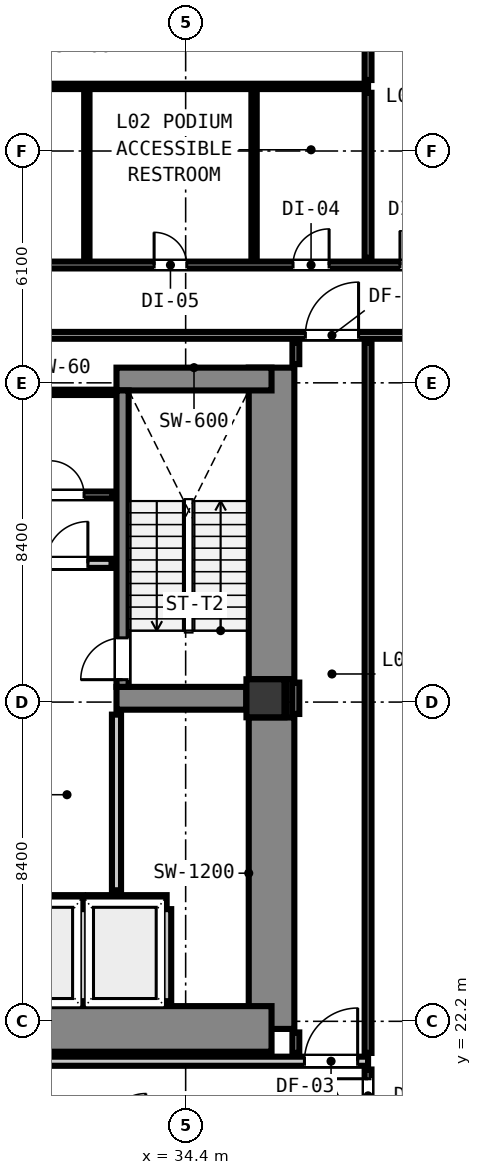
"""IFC4 building model, lengths in metres.
Left out: names, types, materials, properties, quantities, classifications, styles, units other than length and angle.
Written with IfcOpenShell. Run it as: python <this file> out.ifc"""

import sys

from ifc_helpers import new_model, si_unit, direction, frame, frame_2d, origin, origin_2d, place, context, subcontext, project, spatial, rectangle, extrude, element, fill, save


model = new_model("IFC4")
c1 = context("Model", 3, precision=1e-05, world=origin(), true_north=direction((0.0, 1.0)))
c2 = subcontext(c1, "Body", "Model", "MODEL_VIEW")
j1 = project(units=[si_unit("LENGTHUNIT", "METRE"), si_unit("PLANEANGLEUNIT", "RADIAN")], contexts=[c1])
p1 = place(None, origin())
s1 = spatial("IfcSite", under=j1, at=p1, CompositionType="ELEMENT")
p2 = place(p1, origin())
s2 = spatial("IfcBuilding", under=s1, at=p2, CompositionType="ELEMENT")
p3 = place(p2, frame((0.0, 0.0, 9.4)))
s3 = spatial("IfcBuildingStorey", under=s2, at=p3, CompositionType="ELEMENT", Elevation=9.4)
p4 = place(p3, frame((36.5, 30.7, 0.0), z_axis=(0.0, 0.0, 1.0), x_axis=(1.0, 0.0, 0.0)))
e1 = element("IfcColumn", 1, at=p4, inside=s3, PredefinedType="COLUMN", context=c2, shape_type="SweptSolid", body=[
    extrude(rectangle(XDim=1.0, YDim=1.0, at=origin_2d()), origin(), (0.0, 0.0, 1.0), 4.2),
])
p5 = place(p3, frame((36.66, 22.0, 0.0), z_axis=(0.0, 0.0, 1.0), x_axis=(0.0, 1.0, 0.0)))
e2 = element("IfcWall", 2, at=p5, inside=s3, PredefinedType="SHEAR", context=c2, shape_type="SweptSolid", body=[
    extrude(rectangle(XDim=8.195, YDim=1.2, at=frame_2d((4.098, 0.0))), origin(), (0.0, 0.0, 1.0), 4.2),
])
p6 = place(p3, frame((36.66, 31.205, 0.0), z_axis=(0.0, 0.0, 1.0), x_axis=(0.0, 1.0, 0.0)))
e3 = element("IfcWall", 3, at=p6, inside=s3, PredefinedType="SHEAR", context=c2, shape_type="SweptSolid", body=[
    extrude(rectangle(XDim=8.195, YDim=1.2, at=frame_2d((4.097, 0.0))), origin(), (0.0, 0.0, 1.0), 4.2),
])
p7 = place(p3, frame((29.705, 22.0, 0.0), z_axis=(0.0, 0.0, 1.0), x_axis=(1.0, 0.0, 0.0)))
e4 = element("IfcWall", 4, at=p7, inside=s3, PredefinedType="SHEAR", context=c2, shape_type="SweptSolid", body=[
    extrude(rectangle(XDim=6.955, YDim=1.2, at=frame_2d((3.478, 0.0))), origin(), (0.0, 0.0, 1.0), 4.2),
])
p8 = place(p3, frame((32.58, 39.1, 0.0), z_axis=(0.0, 0.0, 1.0), x_axis=(1.0, 0.0, 0.0)))
e5 = element("IfcWall", 5, at=p8, inside=s3, PredefinedType="SHEAR", context=c2, shape_type="SweptSolid", body=[
    extrude(rectangle(XDim=4.08, YDim=0.6, at=frame_2d((2.04, 0.0))), origin(), (0.0, 0.0, 1.0), 4.2),
])
p9 = place(p3, frame((32.58, 30.7, 0.0), z_axis=(0.0, 0.0, 1.0), x_axis=(1.0, 0.0, 0.0)))
e6 = element("IfcWall", 6, at=p9, inside=s3, PredefinedType="SHEAR", context=c2, shape_type="SweptSolid", body=[
    extrude(rectangle(XDim=3.415, YDim=0.6, at=frame_2d((1.708, 0.0))), origin(), (0.0, 0.0, 1.0), 4.2),
])
p10 = place(p3, frame((32.74, 31.0, 0.0), z_axis=(0.0, 0.0, 1.0), x_axis=(0.0, 1.0, 0.0)))
e7 = element("IfcWall", 7, at=p10, inside=s3, PredefinedType="SHEAR", context=c2, shape_type="SweptSolid", body=[
    extrude(rectangle(XDim=7.8, YDim=0.32, at=frame_2d((3.9, 0.0))), origin(), (0.0, 0.0, 1.0), 4.2),
])
p11 = place(p10, frame((0.19, 0.0, 0.0)))
e8 = element("IfcOpeningElement", 8, at=p11, cuts=e7, PredefinedType="OPENING", context=c2, shape_type="SweptSolid", body=[
    extrude(rectangle(XDim=1.1, YDim=2.15, at=frame_2d((0.55, 1.075))), frame((0.0, 0.17, 0.0), z_axis=(0.0, -1.0, 0.0), x_axis=(1.0, 0.0, 0.0)), (0.0, 0.0, 1.0), 0.34),
])
p12 = place(p3, frame((29.5, 25.4, 0.0), z_axis=(0.0, 0.0, 1.0), x_axis=(1.0, 0.0, 0.0)))
e9 = element("IfcWall", 9, at=p12, inside=s3, PredefinedType="PARTITIONING", context=c2, shape_type="SweptSolid", body=[
    extrude(rectangle(XDim=2.2, YDim=0.24, at=frame_2d((1.1, 0.0))), origin(), (0.0, 0.0, 1.0), 3.92),
])
p13 = place(p3, frame((31.7, 22.73, 0.0), z_axis=(0.0, 0.0, 1.0), x_axis=(0.0, 1.0, 0.0)))
e10 = element("IfcWall", 10, at=p13, inside=s3, PredefinedType="PARTITIONING", context=c2, shape_type="SweptSolid", body=[
    extrude(rectangle(XDim=2.422, YDim=0.24, at=frame_2d((1.211, 0.0))), origin(), (0.0, 0.0, 1.0), 3.92),
])
p14 = place(p3, frame((31.828, 25.4, 0.0), z_axis=(0.0, 0.0, 1.0), x_axis=(1.0, 0.0, 0.0)))
e11 = element("IfcWall", 11, at=p14, inside=s3, PredefinedType="PARTITIONING", context=c2, shape_type="SweptSolid", body=[
    extrude(rectangle(XDim=2.072, YDim=0.24, at=frame_2d((1.036, 0.0))), origin(), (0.0, 0.0, 1.0), 3.92),
])
p15 = place(p3, frame((33.9, 22.73, 0.0), z_axis=(0.0, 0.0, 1.0), x_axis=(0.0, 1.0, 0.0)))
e12 = element("IfcWall", 12, at=p15, inside=s3, PredefinedType="PARTITIONING", context=c2, shape_type="SweptSolid", body=[
    extrude(rectangle(XDim=2.422, YDim=0.24, at=frame_2d((1.211, 0.0))), origin(), (0.0, 0.0, 1.0), 3.92),
])
p16 = place(p3, frame((10.5, 21.15, 0.0), z_axis=(0.0, 0.0, 1.0), x_axis=(1.0, 0.0, 0.0)))
e13 = element("IfcWall", 13, at=p16, inside=s3, PredefinedType="PARTITIONING", context=c2, shape_type="SweptSolid", body=[
    extrude(rectangle(XDim=28.7, YDim=0.24, at=frame_2d((14.35, 0.0))), origin(), (0.0, 0.0, 1.0), 3.92),
])
p17 = place(p16, frame((7.71, 0.0, 0.0)))
e14 = element("IfcOpeningElement", 14, at=p17, cuts=e13, PredefinedType="OPENING", context=c2, shape_type="SweptSolid", body=[
    extrude(rectangle(XDim=1.1, YDim=2.15, at=frame_2d((0.55, 1.075))), frame((0.0, 0.13, 0.0), z_axis=(0.0, -1.0, 0.0), x_axis=(1.0, 0.0, 0.0)), (0.0, 0.0, 1.0), 0.26),
])
p18 = place(p16, frame((0.324, 0.0, 0.0)))
e15 = element("IfcOpeningElement", 15, at=p18, cuts=e13, PredefinedType="OPENING", context=c2, shape_type="SweptSolid", body=[
    extrude(rectangle(XDim=1.4, YDim=2.15, at=frame_2d((0.7, 1.075))), frame((0.0, 0.13, 0.0), z_axis=(0.0, -1.0, 0.0), x_axis=(1.0, 0.0, 0.0)), (0.0, 0.0, 1.0), 0.26),
])
p19 = place(p16, frame((27.026, 0.0, 0.0)))
e16 = element("IfcOpeningElement", 16, at=p19, cuts=e13, PredefinedType="OPENING", context=c2, shape_type="SweptSolid", body=[
    extrude(rectangle(XDim=1.4, YDim=2.15, at=frame_2d((0.7, 1.075))), frame((0.0, 0.13, 0.0), z_axis=(0.0, -1.0, 0.0), x_axis=(1.0, 0.0, 0.0)), (0.0, 0.0, 1.0), 0.26),
])
p20 = place(p3, frame((29.975, 34.25, 0.0), z_axis=(0.0, 0.0, 1.0), x_axis=(1.0, 0.0, 0.0)))
e17 = element("IfcWall", 17, at=p20, inside=s3, PredefinedType="PARTITIONING", context=c2, shape_type="SweptSolid", body=[
    extrude(rectangle(XDim=2.475, YDim=0.24, at=frame_2d((1.237, 0.0))), origin(), (0.0, 0.0, 1.0), 3.92),
])
p21 = place(p20, frame((0.752, 0.0, 0.0)))
e18 = element("IfcOpeningElement", 18, at=p21, cuts=e17, PredefinedType="OPENING", context=c2, shape_type="SweptSolid", body=[
    extrude(rectangle(XDim=1.1, YDim=2.15, at=frame_2d((0.55, 1.075))), frame((0.0, 0.13, 0.0), z_axis=(0.0, -1.0, 0.0), x_axis=(1.0, 0.0, 0.0)), (0.0, 0.0, 1.0), 0.26),
])
p22 = place(p3, frame((29.975, 36.05, 0.0), z_axis=(0.0, 0.0, 1.0), x_axis=(1.0, 0.0, 0.0)))
e19 = element("IfcWall", 19, at=p22, inside=s3, PredefinedType="PARTITIONING", context=c2, shape_type="SweptSolid", body=[
    extrude(rectangle(XDim=2.505, YDim=0.18, at=frame_2d((1.252, 0.0))), origin(), (0.0, 0.0, 1.0), 3.92),
])
p23 = place(p22, frame((0.852, 0.0, 0.0)))
e20 = element("IfcOpeningElement", 20, at=p23, cuts=e19, PredefinedType="OPENING", context=c2, shape_type="SweptSolid", body=[
    extrude(rectangle(XDim=0.9, YDim=2.1, at=frame_2d((0.45, 1.05))), frame((0.0, 0.1, 0.0), z_axis=(0.0, -1.0, 0.0), x_axis=(1.0, 0.0, 0.0)), (0.0, 0.0, 1.0), 0.2),
])
p24 = place(p3, frame((10.5, 40.25, 0.0), z_axis=(0.0, 0.0, 1.0), x_axis=(1.0, 0.0, 0.0)))
e21 = element("IfcWall", 21, at=p24, inside=s3, PredefinedType="PARTITIONING", context=c2, shape_type="SweptSolid", body=[
    extrude(rectangle(XDim=37.148, YDim=0.18, at=frame_2d((18.574, 0.0))), origin(), (0.0, 0.0, 1.0), 3.92),
])
p25 = place(p24, frame((6.935, 0.0, 0.0)))
e22 = element("IfcOpeningElement", 22, at=p25, cuts=e21, PredefinedType="OPENING", context=c2, shape_type="SweptSolid", body=[
    extrude(rectangle(XDim=1.4, YDim=2.15, at=frame_2d((0.7, 1.075))), frame((0.0, 0.1, 0.0), z_axis=(0.0, -1.0, 0.0), x_axis=(1.0, 0.0, 0.0)), (0.0, 0.0, 1.0), 0.2),
])
p26 = place(p24, frame((0.324, 0.0, 0.0)))
e23 = element("IfcOpeningElement", 23, at=p26, cuts=e21, PredefinedType="OPENING", context=c2, shape_type="SweptSolid", body=[
    extrude(rectangle(XDim=1.4, YDim=2.15, at=frame_2d((0.7, 1.075))), frame((0.0, 0.1, 0.0), z_axis=(0.0, -1.0, 0.0), x_axis=(1.0, 0.0, 0.0)), (0.0, 0.0, 1.0), 0.2),
])
p27 = place(p24, frame((27.05, 0.0, 0.0)))
e24 = element("IfcOpeningElement", 24, at=p27, cuts=e21, PredefinedType="OPENING", context=c2, shape_type="SweptSolid", body=[
    extrude(rectangle(XDim=1.4, YDim=2.15, at=frame_2d((0.7, 1.075))), frame((0.0, 0.1, 0.0), z_axis=(0.0, -1.0, 0.0), x_axis=(1.0, 0.0, 0.0)), (0.0, 0.0, 1.0), 0.2),
])
p28 = place(p3, frame((4.352, 42.1, 0.0), z_axis=(0.0, 0.0, 1.0), x_axis=(1.0, 0.0, 0.0)))
e25 = element("IfcWall", 25, at=p28, inside=s3, PredefinedType="PARTITIONING", context=c2, shape_type="SweptSolid", body=[
    extrude(rectangle(XDim=43.296, YDim=0.18, at=frame_2d((21.648, 0.0))), origin(), (0.0, 0.0, 1.0), 3.92),
])
p29 = place(p28, frame((14.472, 0.0, 0.0)))
e26 = element("IfcOpeningElement", 26, at=p29, cuts=e25, PredefinedType="OPENING", context=c2, shape_type="SweptSolid", body=[
    extrude(rectangle(XDim=0.9, YDim=2.1, at=frame_2d((0.45, 1.05))), frame((0.0, 0.1, 0.0), z_axis=(0.0, -1.0, 0.0), x_axis=(1.0, 0.0, 0.0)), (0.0, 0.0, 1.0), 0.2),
])
p30 = place(p28, frame((25.118, 0.0, 0.0)))
e27 = element("IfcOpeningElement", 27, at=p30, cuts=e25, PredefinedType="OPENING", context=c2, shape_type="SweptSolid", body=[
    extrude(rectangle(XDim=0.86, YDim=2.02, at=frame_2d((0.43, 1.01))), frame((0.0, 0.1, 0.0), z_axis=(0.0, -1.0, 0.0), x_axis=(1.0, 0.0, 0.0)), (0.0, 0.0, 1.0), 0.2),
])
p31 = place(p28, frame((29.218, 0.0, 0.0)))
e28 = element("IfcOpeningElement", 28, at=p31, cuts=e25, PredefinedType="OPENING", context=c2, shape_type="SweptSolid", body=[
    extrude(rectangle(XDim=0.86, YDim=2.02, at=frame_2d((0.43, 1.01))), frame((0.0, 0.1, 0.0), z_axis=(0.0, -1.0, 0.0), x_axis=(1.0, 0.0, 0.0)), (0.0, 0.0, 1.0), 0.2),
])
p32 = place(p28, frame((32.873, 0.0, 0.0)))
e29 = element("IfcOpeningElement", 29, at=p32, cuts=e25, PredefinedType="OPENING", context=c2, shape_type="SweptSolid", body=[
    extrude(rectangle(XDim=0.95, YDim=2.1, at=frame_2d((0.475, 1.05))), frame((0.0, 0.1, 0.0), z_axis=(0.0, -1.0, 0.0), x_axis=(1.0, 0.0, 0.0)), (0.0, 0.0, 1.0), 0.2),
])
p33 = place(p28, frame((35.688, 0.0, 0.0)))
e30 = element("IfcOpeningElement", 30, at=p33, cuts=e25, PredefinedType="OPENING", context=c2, shape_type="SweptSolid", body=[
    extrude(rectangle(XDim=0.9, YDim=2.1, at=frame_2d((0.45, 1.05))), frame((0.0, 0.1, 0.0), z_axis=(0.0, -1.0, 0.0), x_axis=(1.0, 0.0, 0.0)), (0.0, 0.0, 1.0), 0.2),
])
p34 = place(p3, frame((29.975, 38.75, 0.0), z_axis=(0.0, 0.0, 1.0), x_axis=(1.0, 0.0, 0.0)))
e31 = element("IfcWall", 31, at=p34, inside=s3, PredefinedType="PARTITIONING", context=c2, shape_type="SweptSolid", body=[
    extrude(rectangle(XDim=2.525, YDim=0.14, at=frame_2d((1.262, 0.0))), origin(), (0.0, 0.0, 1.0), 3.92),
])
p35 = place(p3, frame((28.0, 46.8, 0.0), z_axis=(0.0, 0.0, 1.0), x_axis=(1.0, 0.0, 0.0)))
e32 = element("IfcWall", 32, at=p35, inside=s3, PredefinedType="PARTITIONING", context=c2, shape_type="SweptSolid", body=[
    extrude(rectangle(XDim=11.2, YDim=0.14, at=frame_2d((5.6, 0.0))), origin(), (0.0, 0.0, 1.0), 3.92),
])
p36 = place(p3, frame((32.58, 25.648, 0.0), z_axis=(0.0, 0.0, 1.0), x_axis=(0.0, 1.0, 0.0)))
e33 = element("IfcWall", 33, at=p36, inside=s3, PredefinedType="PARTITIONING", context=c2, shape_type="SweptSolid", body=[
    extrude(rectangle(XDim=4.622, YDim=0.24, at=frame_2d((2.311, 0.0))), origin(), (0.0, 0.0, 1.0), 3.92),
])
p37 = place(p3, frame((37.3, 21.368, 0.0), z_axis=(0.0, 0.0, 1.0), x_axis=(0.0, 1.0, 0.0)))
e34 = element("IfcWall", 34, at=p37, inside=s3, PredefinedType="PARTITIONING", context=c2, shape_type="SweptSolid", body=[
    extrude(rectangle(XDim=0.54, YDim=0.18, at=frame_2d((0.27, 0.0))), origin(), (0.0, 0.0, 1.0), 3.92),
])
p38 = place(p3, frame((37.3, 30.287, 0.0), z_axis=(0.0, 0.0, 1.0), x_axis=(0.0, 1.0, 0.0)))
e35 = element("IfcWall", 35, at=p38, inside=s3, PredefinedType="PARTITIONING", context=c2, shape_type="SweptSolid", body=[
    extrude(rectangle(XDim=0.826, YDim=0.18, at=frame_2d((0.413, 0.0))), origin(), (0.0, 0.0, 1.0), 3.92),
])
p39 = place(p3, frame((37.3, 39.492, 0.0), z_axis=(0.0, 0.0, 1.0), x_axis=(0.0, 1.0, 0.0)))
e36 = element("IfcWall", 36, at=p39, inside=s3, PredefinedType="PARTITIONING", context=c2, shape_type="SweptSolid", body=[
    extrude(rectangle(XDim=0.57, YDim=0.18, at=frame_2d((0.285, 0.0))), origin(), (0.0, 0.0, 1.0), 3.92),
])
p40 = place(p3, frame((39.2, 19.488, 0.0), z_axis=(0.0, 0.0, 1.0), x_axis=(0.0, 1.0, 0.0)))
e37 = element("IfcWall", 37, at=p40, inside=s3, PredefinedType="PARTITIONING", context=c2, shape_type="SweptSolid", body=[
    extrude(rectangle(XDim=1.444, YDim=0.18, at=frame_2d((0.722, 0.0))), origin(), (0.0, 0.0, 1.0), 3.92),
])
p41 = place(p40, frame((0.301, 0.0, 0.0)))
e38 = element("IfcOpeningElement", 38, at=p41, cuts=e37, PredefinedType="OPENING", context=c2, shape_type="SweptSolid", body=[
    extrude(rectangle(XDim=0.9, YDim=2.1, at=frame_2d((0.45, 1.05))), frame((0.0, 0.1, 0.0), z_axis=(0.0, -1.0, 0.0), x_axis=(1.0, 0.0, 0.0)), (0.0, 0.0, 1.0), 0.2),
])
p42 = place(p3, frame((39.2, 21.368, 0.0), z_axis=(0.0, 0.0, 1.0), x_axis=(0.0, 1.0, 0.0)))
e39 = element("IfcWall", 39, at=p42, inside=s3, PredefinedType="PARTITIONING", context=c2, shape_type="SweptSolid", body=[
    extrude(rectangle(XDim=18.694, YDim=0.18, at=frame_2d((9.347, 0.0))), origin(), (0.0, 0.0, 1.0), 3.92),
])
p43 = place(p3, frame((39.2, 42.288, 0.0), z_axis=(0.0, 0.0, 1.0), x_axis=(0.0, 1.0, 0.0)))
e40 = element("IfcWall", 40, at=p43, inside=s3, PredefinedType="PARTITIONING", context=c2, shape_type="SweptSolid", body=[
    extrude(rectangle(XDim=4.344, YDim=0.18, at=frame_2d((2.172, 0.0))), origin(), (0.0, 0.0, 1.0), 3.92),
])
p44 = place(p3, frame((39.2, 46.968, 0.0), z_axis=(0.0, 0.0, 1.0), x_axis=(0.0, 1.0, 0.0)))
e41 = element("IfcWall", 41, at=p44, inside=s3, PredefinedType="PARTITIONING", context=c2, shape_type="SweptSolid", body=[
    extrude(rectangle(XDim=3.88, YDim=0.18, at=frame_2d((1.94, 0.0))), origin(), (0.0, 0.0, 1.0), 3.92),
])
for number, where, z_axis, x_axis in (
    (42, (31.8, 42.268, 0.0), (0.0, 0.0, 1.0), (0.0, 1.0, 0.0)),
    (43, (36.2, 42.268, 0.0), (0.0, 0.0, 1.0), (0.0, 1.0, 0.0)),
):
    element("IfcWall", number, at=place(p3, frame(where, z_axis=z_axis, x_axis=x_axis)), inside=s3, PredefinedType="PARTITIONING", context=c2, shape_type="SweptSolid", body=[
        extrude(rectangle(XDim=4.384, YDim=0.14, at=frame_2d((2.192, 0.0))), origin(), (0.0, 0.0, 1.0), 3.92),
    ])
p45 = place(p3, frame((37.032, 30.21, 0.0), z_axis=(0.0, 0.0, 1.0), x_axis=(0.0, 1.0, 0.0)))
e44 = element("IfcWall", 44, at=p45, inside=s3, PredefinedType="PARTITIONING", context=c2, shape_type="SweptSolid", body=[
    extrude(rectangle(XDim=0.98, YDim=0.06, at=frame_2d((0.49, 0.0))), origin(), (0.0, 0.0, 1.0), 1.45),
])
p46 = place(p11, origin())
e45 = element("IfcDoor", 45, at=p46, inside=s3, OperationType="SINGLE_SWING_LEFT", PredefinedType="DOOR", context=c2, shape_type="SweptSolid", body=[
    extrude(rectangle(XDim=1.1, YDim=2.15, at=frame_2d((0.55, 1.075))), frame((0.0, 0.025, 0.0), z_axis=(0.0, -1.0, 0.0), x_axis=(1.0, 0.0, 0.0)), (0.0, 0.0, 1.0), 0.05),
])
fill(e8, e45)
p47 = place(p21, origin())
e46 = element("IfcDoor", 46, at=p47, inside=s3, OperationType="SINGLE_SWING_RIGHT", PredefinedType="DOOR", context=c2, shape_type="SweptSolid", body=[
    extrude(rectangle(XDim=1.1, YDim=2.15, at=frame_2d((0.55, 1.075))), frame((0.0, 0.025, 0.0), z_axis=(0.0, -1.0, 0.0), x_axis=(1.0, 0.0, 0.0)), (0.0, 0.0, 1.0), 0.05),
])
fill(e18, e46)
p48 = place(p19, origin())
e47 = element("IfcDoor", 47, at=p48, inside=s3, OperationType="SINGLE_SWING_RIGHT", PredefinedType="DOOR", context=c2, shape_type="SweptSolid", body=[
    extrude(rectangle(XDim=1.4, YDim=2.15, at=frame_2d((0.7, 1.075))), frame((0.0, 0.025, 0.0), z_axis=(0.0, -1.0, 0.0), x_axis=(1.0, 0.0, 0.0)), (0.0, 0.0, 1.0), 0.05),
])
fill(e16, e47)
p49 = place(p27, origin())
e48 = element("IfcDoor", 48, at=p49, inside=s3, OperationType="SINGLE_SWING_RIGHT", PredefinedType="DOOR", context=c2, shape_type="SweptSolid", body=[
    extrude(rectangle(XDim=1.4, YDim=2.15, at=frame_2d((0.7, 1.075))), frame((0.0, 0.025, 0.0), z_axis=(0.0, -1.0, 0.0), x_axis=(1.0, 0.0, 0.0)), (0.0, 0.0, 1.0), 0.05),
])
fill(e24, e48)
p50 = place(p23, origin())
e49 = element("IfcDoor", 49, at=p50, inside=s3, OperationType="SINGLE_SWING_LEFT", PredefinedType="DOOR", context=c2, shape_type="SweptSolid", body=[
    extrude(rectangle(XDim=0.9, YDim=2.1, at=frame_2d((0.45, 1.05))), frame((0.0, 0.025, 0.0), z_axis=(0.0, -1.0, 0.0), x_axis=(1.0, 0.0, 0.0)), (0.0, 0.0, 1.0), 0.05),
])
fill(e20, e49)
p51 = place(p41, origin())
e50 = element("IfcDoor", 50, at=p51, inside=s3, OperationType="SINGLE_SWING_RIGHT", PredefinedType="DOOR", context=c2, shape_type="SweptSolid", body=[
    extrude(rectangle(XDim=0.9, YDim=2.1, at=frame_2d((0.45, 1.05))), frame((0.0, 0.025, 0.0), z_axis=(0.0, -1.0, 0.0), x_axis=(1.0, 0.0, 0.0)), (0.0, 0.0, 1.0), 0.05),
])
fill(e38, e50)
p52 = place(p31, origin())
e51 = element("IfcDoor", 51, at=p52, inside=s3, OperationType="SINGLE_SWING_LEFT", PredefinedType="DOOR", context=c2, shape_type="SweptSolid", body=[
    extrude(rectangle(XDim=0.86, YDim=2.02, at=frame_2d((0.43, 1.01))), frame((0.0, 0.025, 0.0), z_axis=(0.0, -1.0, 0.0), x_axis=(1.0, 0.0, 0.0)), (0.0, 0.0, 1.0), 0.05),
])
fill(e28, e51)
p53 = place(p32, origin())
e52 = element("IfcDoor", 52, at=p53, inside=s3, OperationType="SINGLE_SWING_RIGHT", PredefinedType="DOOR", context=c2, shape_type="SweptSolid", body=[
    extrude(rectangle(XDim=0.95, YDim=2.1, at=frame_2d((0.475, 1.05))), frame((0.0, 0.025, 0.0), z_axis=(0.0, -1.0, 0.0), x_axis=(1.0, 0.0, 0.0)), (0.0, 0.0, 1.0), 0.05),
])
fill(e29, e52)
p54 = place(p33, origin())
e53 = element("IfcDoor", 53, at=p54, inside=s3, OperationType="SINGLE_SWING_LEFT", PredefinedType="DOOR", context=c2, shape_type="SweptSolid", body=[
    extrude(rectangle(XDim=0.9, YDim=2.1, at=frame_2d((0.45, 1.05))), frame((0.0, 0.025, 0.0), z_axis=(0.0, -1.0, 0.0), x_axis=(1.0, 0.0, 0.0)), (0.0, 0.0, 1.0), 0.05),
])
fill(e30, e53)
save(model, sys.argv[1])
